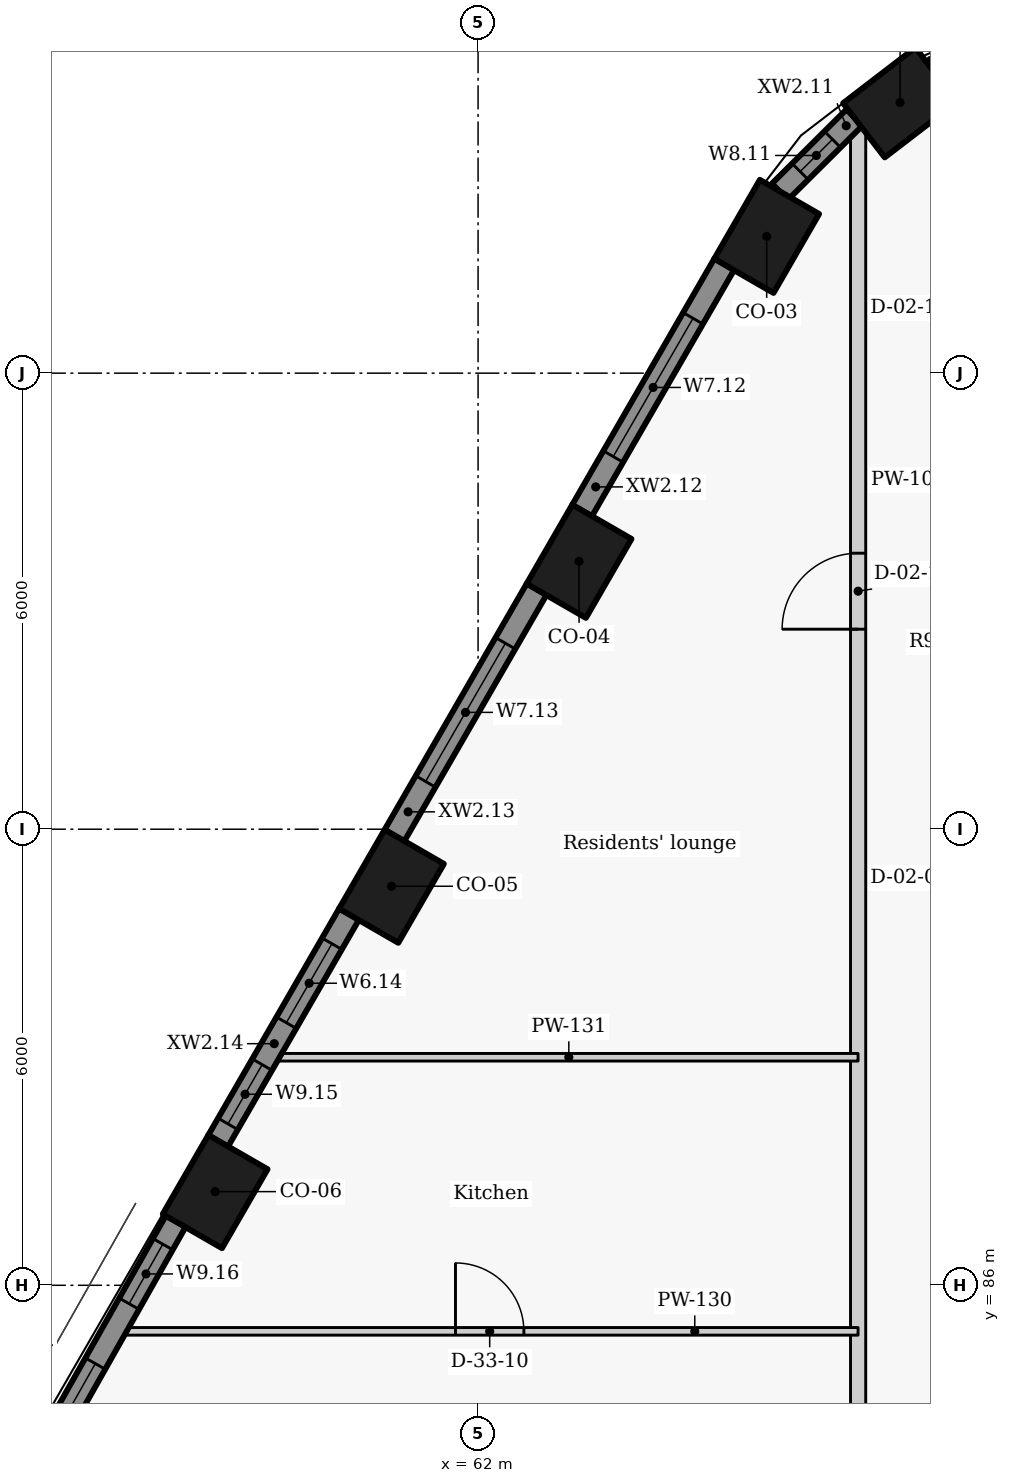
"""IFC4 building model, lengths in metres.
Left out: names, types, materials, properties, quantities, classifications, styles, units other than length and angle.
Written with IfcOpenShell. Run it as: python <this file> out.ifc"""

import sys

from ifc_helpers import new_model, si_unit, direction, frame, frame_2d, origin, origin_2d, place, context, subcontext, project, spatial, rectangle, extrude, element, fill, save


model = new_model("IFC4")
c1 = context("Model", 3, precision=1e-05, world=origin(), true_north=direction((0.0, 1.0)))
c2 = subcontext(c1, "Body", "Model", "MODEL_VIEW")
j1 = project(units=[si_unit("LENGTHUNIT", "METRE"), si_unit("PLANEANGLEUNIT", "RADIAN")], contexts=[c1])
p1 = place(None, origin())
s1 = spatial("IfcSite", under=j1, at=p1, CompositionType="ELEMENT")
p2 = place(p1, origin())
s2 = spatial("IfcBuilding", under=s1, at=p2, CompositionType="ELEMENT")
p3 = place(p2, frame((0.0, 0.0, 183.3)))
s3 = spatial("IfcBuildingStorey", under=s2, at=p3, CompositionType="ELEMENT", Elevation=183.3)
for number, where, z_axis, x_axis in (
    (1, (67.552, 101.56, 0.0), (0.0, 0.0, 1.0), (-0.793, -0.609, 0.0)),
    (2, (65.797, 99.8, 0.0), (0.0, 0.0, 1.0), (-0.5, -0.866, 0.0)),
    (3, (63.329, 95.525, 0.0), (0.0, 0.0, 1.0), (-0.5, -0.866, 0.0)),
    (4, (60.861, 91.25, 0.0), (0.0, 0.0, 1.0), (-0.5, -0.866, 0.0)),
    (5, (58.541, 87.232, 0.0), (0.0, 0.0, 1.0), (-0.5, -0.866, 0.0)),
):
    element("IfcColumn", number, at=place(p3, frame(where, z_axis=z_axis, x_axis=x_axis)), inside=s3, PredefinedType="COLUMN", context=c2, shape_type="SweptSolid", body=[
        extrude(rectangle(XDim=1.2, YDim=0.9, at=origin_2d()), origin(), (0.0, 0.0, 1.0), 3.3),
    ])
p4 = place(p3, frame((69.336, 102.333, 0.0), z_axis=(0.0, 0.0, 1.0), x_axis=(-0.969037396898, -0.246914000036, 0.0)))
e6 = element("IfcWall", 6, at=p4, inside=s3, PredefinedType="SOLIDWALL", context=c2, shape_type="SweptSolid", body=[
    extrude(rectangle(XDim=1.403, YDim=0.3, at=frame_2d((0.702, 0.0))), origin(), (0.0, 0.0, 1.0), 2.425),
])
p5 = place(p4, frame((0.229, 0.0, 0.9)))
e7 = element("IfcOpeningElement", 7, at=p5, cuts=e6, PredefinedType="OPENING", context=c2, shape_type="SweptSolid", body=[
    extrude(rectangle(XDim=0.6, YDim=1.1, at=frame_2d((0.3, 0.55))), frame((0.0, 0.16, 0.0), z_axis=(0.0, -1.0, 0.0), x_axis=(1.0, 0.0, 0.0)), (0.0, 0.0, 1.0), 0.32),
])
p6 = place(p3, frame((66.952, 101.363, 0.0), z_axis=(0.0, 0.0, 1.0), x_axis=(-0.70869320446, -0.705516790695, 0.0)))
e8 = element("IfcWall", 8, at=p6, inside=s3, PredefinedType="SOLIDWALL", context=c2, shape_type="SweptSolid", body=[
    extrude(rectangle(XDim=1.384, YDim=0.3, at=frame_2d((0.692, 0.0))), origin(), (0.0, 0.0, 1.0), 2.425),
])
p7 = place(p6, frame((0.408, 0.0, 0.9)))
e9 = element("IfcOpeningElement", 9, at=p7, cuts=e8, PredefinedType="OPENING", context=c2, shape_type="SweptSolid", body=[
    extrude(rectangle(XDim=0.6, YDim=1.1, at=frame_2d((0.3, 0.55))), frame((0.0, 0.16, 0.0), z_axis=(0.0, -1.0, 0.0), x_axis=(1.0, 0.0, 0.0)), (0.0, 0.0, 1.0), 0.32),
])
p8 = place(p3, frame((65.239, 99.433, 0.0), z_axis=(0.0, 0.0, 1.0), x_axis=(-0.499982088007, -0.866035745032, 0.0)))
e10 = element("IfcWall", 10, at=p8, inside=s3, PredefinedType="SOLIDWALL", context=c2, shape_type="SweptSolid", body=[
    extrude(rectangle(XDim=3.744, YDim=0.3, at=frame_2d((1.872, 0.0))), origin(), (0.0, 0.0, 1.0), 2.425),
])
p9 = place(p8, frame((0.822, 0.0, 0.9)))
e11 = element("IfcOpeningElement", 11, at=p9, cuts=e10, PredefinedType="OPENING", context=c2, shape_type="SweptSolid", body=[
    extrude(rectangle(XDim=2.1, YDim=1.1, at=frame_2d((1.05, 0.55))), frame((0.0, 0.16, 0.0), z_axis=(0.0, -1.0, 0.0), x_axis=(1.0, 0.0, 0.0)), (0.0, 0.0, 1.0), 0.32),
])
p10 = place(p3, frame((62.771, 95.158, 0.0), z_axis=(0.0, 0.0, 1.0), x_axis=(-0.500059225181, -0.86599120741, 0.0)))
e12 = element("IfcWall", 12, at=p10, inside=s3, PredefinedType="SOLIDWALL", context=c2, shape_type="SweptSolid", body=[
    extrude(rectangle(XDim=3.744, YDim=0.3, at=frame_2d((1.872, 0.0))), origin(), (0.0, 0.0, 1.0), 2.425),
])
p11 = place(p10, frame((0.822, 0.0, 0.9)))
e13 = element("IfcOpeningElement", 13, at=p11, cuts=e12, PredefinedType="OPENING", context=c2, shape_type="SweptSolid", body=[
    extrude(rectangle(XDim=2.1, YDim=1.1, at=frame_2d((1.05, 0.55))), frame((0.0, 0.16, 0.0), z_axis=(0.0, -1.0, 0.0), x_axis=(1.0, 0.0, 0.0)), (0.0, 0.0, 1.0), 0.32),
])
p12 = place(p3, frame((60.303, 90.884, 0.0), z_axis=(0.0, 0.0, 1.0), x_axis=(-0.499955427682, -0.866051136095, 0.0)))
e14 = element("IfcWall", 14, at=p12, inside=s3, PredefinedType="SOLIDWALL", context=c2, shape_type="SweptSolid", body=[
    extrude(rectangle(XDim=3.447, YDim=0.3, at=frame_2d((1.724, 0.0))), origin(), (0.0, 0.0, 1.0), 2.425),
])
p13 = place(p12, frame((0.45, 0.0, 0.9)))
e15 = element("IfcOpeningElement", 15, at=p13, cuts=e14, PredefinedType="OPENING", context=c2, shape_type="SweptSolid", body=[
    extrude(rectangle(XDim=1.2, YDim=1.1, at=frame_2d((0.6, 0.55))), frame((0.0, 0.16, 0.0), z_axis=(0.0, -1.0, 0.0), x_axis=(1.0, 0.0, 0.0)), (0.0, 0.0, 1.0), 0.32),
])
p14 = place(p12, frame((2.287, 0.0, 0.9)))
e16 = element("IfcOpeningElement", 16, at=p14, cuts=e14, PredefinedType="OPENING", context=c2, shape_type="SweptSolid", body=[
    extrude(rectangle(XDim=0.9, YDim=1.1, at=frame_2d((0.45, 0.55))), frame((0.0, 0.16, 0.0), z_axis=(0.0, -1.0, 0.0), x_axis=(1.0, 0.0, 0.0)), (0.0, 0.0, 1.0), 0.32),
])
p15 = place(p3, frame((58.023, 86.843, 0.0), z_axis=(0.0, 0.0, 1.0), x_axis=(-0.492033360928, -0.870576344575, 0.0)))
e17 = element("IfcWall", 17, at=p15, inside=s3, PredefinedType="SOLIDWALL", context=c2, shape_type="SweptSolid", body=[
    extrude(rectangle(XDim=5.387, YDim=0.3, at=frame_2d((2.693, 0.0))), origin(), (0.0, 0.0, 1.0), 2.425),
])
p16 = place(p15, frame((0.347, 0.0, 0.9)))
e18 = element("IfcOpeningElement", 18, at=p16, cuts=e17, PredefinedType="OPENING", context=c2, shape_type="SweptSolid", body=[
    extrude(rectangle(XDim=0.9, YDim=1.1, at=frame_2d((0.45, 0.55))), frame((0.0, 0.16, 0.0), z_axis=(0.0, -1.0, 0.0), x_axis=(1.0, 0.0, 0.0)), (0.0, 0.0, 1.0), 0.32),
])
p17 = place(p15, frame((2.152, 0.0, 0.9)))
e19 = element("IfcOpeningElement", 19, at=p17, cuts=e17, PredefinedType="OPENING", context=c2, shape_type="SweptSolid", body=[
    extrude(rectangle(XDim=2.1, YDim=1.1, at=frame_2d((1.05, 0.55))), frame((0.0, 0.16, 0.0), z_axis=(0.0, -1.0, 0.0), x_axis=(1.0, 0.0, 0.0)), (0.0, 0.0, 1.0), 0.32),
])
p18 = place(p3, frame((67.0, 58.674, 0.0), z_axis=(0.0, 0.0, 1.0), x_axis=(0.0, 1.0, 0.0)))
e20 = element("IfcWall", 20, at=p18, inside=s3, PredefinedType="PARTITIONING", context=c2, shape_type="SweptSolid", body=[
    extrude(rectangle(XDim=42.592, YDim=0.2, at=frame_2d((21.296, 0.0))), origin(), (0.0, 0.0, 1.0), 2.405),
])
p19 = place(p18, frame((2.376, 0.0, 0.0)))
e21 = element("IfcOpeningElement", 21, at=p19, cuts=e20, PredefinedType="OPENING", context=c2, shape_type="SweptSolid", body=[
    extrude(rectangle(XDim=1.0, YDim=2.1, at=frame_2d((0.5, 1.05))), frame((0.0, 0.11, 0.0), z_axis=(0.0, -1.0, 0.0), x_axis=(1.0, 0.0, 0.0)), (0.0, 0.0, 1.0), 0.22),
])
p20 = place(p18, frame((13.826, 0.0, 0.0)))
e22 = element("IfcOpeningElement", 22, at=p20, cuts=e20, PredefinedType="OPENING", context=c2, shape_type="SweptSolid", body=[
    extrude(rectangle(XDim=1.0, YDim=2.1, at=frame_2d((0.5, 1.05))), frame((0.0, 0.11, 0.0), z_axis=(0.0, -1.0, 0.0), x_axis=(1.0, 0.0, 0.0)), (0.0, 0.0, 1.0), 0.22),
])
p21 = place(p18, frame((35.957, 0.0, 0.0)))
e23 = element("IfcOpeningElement", 23, at=p21, cuts=e20, PredefinedType="OPENING", context=c2, shape_type="SweptSolid", body=[
    extrude(rectangle(XDim=1.0, YDim=2.1, at=frame_2d((0.5, 1.05))), frame((0.0, 0.11, 0.0), z_axis=(0.0, -1.0, 0.0), x_axis=(1.0, 0.0, 0.0)), (0.0, 0.0, 1.0), 0.22),
])
p22 = place(p3, frame((57.307, 85.394, 0.0), z_axis=(0.0, 0.0, 1.0), x_axis=(1.0, 0.0, 0.0)))
e24 = element("IfcWall", 24, at=p22, inside=s3, PredefinedType="PARTITIONING", context=c2, shape_type="SweptSolid", body=[
    extrude(rectangle(XDim=9.692, YDim=0.1, at=frame_2d((4.846, 0.0))), origin(), (0.0, 0.0, 1.0), 2.405),
])
p23 = place(p22, frame((4.396, 0.0, 0.0)))
e25 = element("IfcOpeningElement", 25, at=p23, cuts=e24, PredefinedType="OPENING", context=c2, shape_type="SweptSolid", body=[
    extrude(rectangle(XDim=0.9, YDim=2.1, at=frame_2d((0.45, 1.05))), frame((0.0, 0.06, 0.0), z_axis=(0.0, -1.0, 0.0), x_axis=(1.0, 0.0, 0.0)), (0.0, 0.0, 1.0), 0.12),
])
p24 = place(p3, frame((59.389, 89.0, 0.0), z_axis=(0.0, 0.0, 1.0), x_axis=(1.0, 0.0, 0.0)))
e26 = element("IfcWall", 26, at=p24, inside=s3, PredefinedType="PARTITIONING", context=c2, shape_type="SweptSolid", body=[
    extrude(rectangle(XDim=7.61, YDim=0.1, at=frame_2d((3.805, 0.0))), origin(), (0.0, 0.0, 1.0), 2.405),
])
p25 = place(p7, origin())
e27 = element("IfcWindow", 27, at=p25, inside=s3, PartitioningType="SINGLE_PANEL", PredefinedType="WINDOW", context=c2, shape_type="SweptSolid", body=[
    extrude(rectangle(XDim=0.6, YDim=1.1, at=frame_2d((0.3, 0.55))), frame((0.0, 0.03, 0.0), z_axis=(0.0, -1.0, 0.0), x_axis=(1.0, 0.0, 0.0)), (0.0, 0.0, 1.0), 0.06),
])
fill(e9, e27)
p26 = place(p9, origin())
e28 = element("IfcWindow", 28, at=p26, inside=s3, PartitioningType="SINGLE_PANEL", PredefinedType="WINDOW", context=c2, shape_type="SweptSolid", body=[
    extrude(rectangle(XDim=2.1, YDim=1.1, at=frame_2d((1.05, 0.55))), frame((0.0, 0.03, 0.0), z_axis=(0.0, -1.0, 0.0), x_axis=(1.0, 0.0, 0.0)), (0.0, 0.0, 1.0), 0.06),
])
fill(e11, e28)
p27 = place(p11, origin())
e29 = element("IfcWindow", 29, at=p27, inside=s3, PartitioningType="SINGLE_PANEL", PredefinedType="WINDOW", context=c2, shape_type="SweptSolid", body=[
    extrude(rectangle(XDim=2.1, YDim=1.1, at=frame_2d((1.05, 0.55))), frame((0.0, 0.03, 0.0), z_axis=(0.0, -1.0, 0.0), x_axis=(1.0, 0.0, 0.0)), (0.0, 0.0, 1.0), 0.06),
])
fill(e13, e29)
p28 = place(p13, origin())
e30 = element("IfcWindow", 30, at=p28, inside=s3, PartitioningType="SINGLE_PANEL", PredefinedType="WINDOW", context=c2, shape_type="SweptSolid", body=[
    extrude(rectangle(XDim=1.2, YDim=1.1, at=frame_2d((0.6, 0.55))), frame((0.0, 0.03, 0.0), z_axis=(0.0, -1.0, 0.0), x_axis=(1.0, 0.0, 0.0)), (0.0, 0.0, 1.0), 0.06),
])
fill(e15, e30)
p29 = place(p14, origin())
e31 = element("IfcWindow", 31, at=p29, inside=s3, PartitioningType="SINGLE_PANEL", PredefinedType="WINDOW", context=c2, shape_type="SweptSolid", body=[
    extrude(rectangle(XDim=0.9, YDim=1.1, at=frame_2d((0.45, 0.55))), frame((0.0, 0.03, 0.0), z_axis=(0.0, -1.0, 0.0), x_axis=(1.0, 0.0, 0.0)), (0.0, 0.0, 1.0), 0.06),
])
fill(e16, e31)
p30 = place(p16, origin())
e32 = element("IfcWindow", 32, at=p30, inside=s3, PartitioningType="SINGLE_PANEL", PredefinedType="WINDOW", context=c2, shape_type="SweptSolid", body=[
    extrude(rectangle(XDim=0.9, YDim=1.1, at=frame_2d((0.45, 0.55))), frame((0.0, 0.03, 0.0), z_axis=(0.0, -1.0, 0.0), x_axis=(1.0, 0.0, 0.0)), (0.0, 0.0, 1.0), 0.06),
])
fill(e18, e32)
p31 = place(p17, origin())
e33 = element("IfcWindow", 33, at=p31, inside=s3, PartitioningType="SINGLE_PANEL", PredefinedType="WINDOW", context=c2, shape_type="SweptSolid", body=[
    extrude(rectangle(XDim=2.1, YDim=1.1, at=frame_2d((1.05, 0.55))), frame((0.0, 0.03, 0.0), z_axis=(0.0, -1.0, 0.0), x_axis=(1.0, 0.0, 0.0)), (0.0, 0.0, 1.0), 0.06),
])
fill(e19, e33)
p32 = place(p23, origin())
e34 = element("IfcDoor", 34, at=p32, inside=s3, OperationType="SINGLE_SWING_LEFT", PredefinedType="DOOR", context=c2, shape_type="SweptSolid", body=[
    extrude(rectangle(XDim=0.9, YDim=2.1, at=frame_2d((0.45, 1.05))), frame((0.0, 0.025, 0.0), z_axis=(0.0, -1.0, 0.0), x_axis=(1.0, 0.0, 0.0)), (0.0, 0.0, 1.0), 0.05),
])
fill(e25, e34)
p33 = place(p21, origin())
e35 = element("IfcDoor", 35, at=p33, inside=s3, OperationType="SINGLE_SWING_LEFT", PredefinedType="DOOR", context=c2, shape_type="SweptSolid", body=[
    extrude(rectangle(XDim=1.0, YDim=2.1, at=frame_2d((0.5, 1.05))), frame((0.0, 0.025, 0.0), z_axis=(0.0, -1.0, 0.0), x_axis=(1.0, 0.0, 0.0)), (0.0, 0.0, 1.0), 0.05),
])
fill(e23, e35)
save(model, sys.argv[1])
